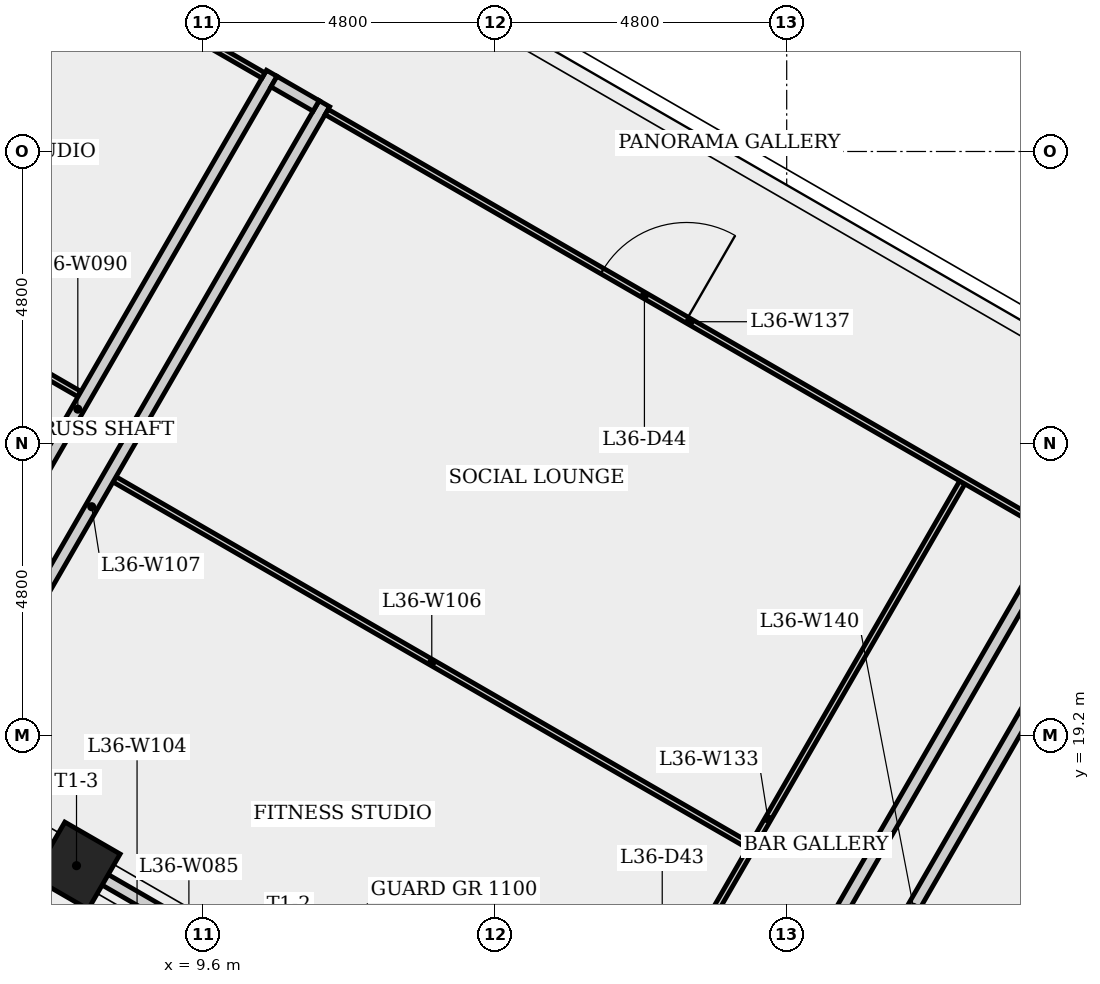
"""IFC4 building model, lengths in metres.
Left out: names, types, materials, properties, quantities, classifications, styles, units other than length and angle.
Written with IfcOpenShell. Run it as: python <this file> out.ifc"""

import sys

from ifc_helpers import new_model, si_unit, direction, frame, frame_2d, origin, origin_2d, place, context, subcontext, project, spatial, rectangle, extrude, element, fill, save


model = new_model("IFC4")
c1 = context("Model", 3, precision=1e-05, world=origin(), true_north=direction((0.0, 1.0)))
c2 = subcontext(c1, "Body", "Model", "MODEL_VIEW")
j1 = project(units=[si_unit("LENGTHUNIT", "METRE"), si_unit("PLANEANGLEUNIT", "RADIAN")], contexts=[c1])
p1 = place(None, origin())
s1 = spatial("IfcSite", under=j1, at=p1, CompositionType="ELEMENT")
p2 = place(p1, origin())
s2 = spatial("IfcBuilding", under=s1, at=p2, CompositionType="ELEMENT")
p3 = place(p2, frame((0.0, 0.0, 135.9)))
s3 = spatial("IfcBuildingStorey", under=s2, at=p3, CompositionType="ELEMENT", Elevation=135.9)
p4 = place(p3, frame((7.52, 17.054, 0.0), z_axis=(0.0, 0.0, 1.0), x_axis=(0.5, 0.866025403784, 0.0)))
e1 = element("IfcColumn", 1, at=p4, inside=s3, PredefinedType="COLUMN", context=c2, shape_type="SweptSolid", body=[
    extrude(rectangle(XDim=1.05, YDim=1.05, at=origin_2d()), origin(), (0.0, 0.0, 1.0), 4.0),
])
p5 = place(p3, frame((2.83, 27.546, 0.0), z_axis=(0.0, 0.0, 1.0), x_axis=(0.866035515232, -0.49998248605, 0.0)))
e2 = element("IfcWall", 2, at=p5, inside=s3, PredefinedType="PARTITIONING", context=c2, shape_type="SweptSolid", body=[
    extrude(rectangle(XDim=5.472, YDim=0.1, at=frame_2d((2.736, 0.0))), origin(), (0.0, 0.0, 1.0), 3.6),
])
p6 = place(p3, frame((3.133, 19.627, 0.0), z_axis=(0.0, 0.0, 1.0), x_axis=(0.866025783705, -0.499999341958, 0.0)))
e3 = element("IfcWall", 3, at=p6, inside=s3, PredefinedType="PLUMBINGWALL", context=c2, shape_type="SweptSolid", body=[
    extrude(rectangle(XDim=14.4, YDim=0.2, at=frame_2d((7.2, 0.0))), origin(), (0.0, 0.0, 1.0), 2.725),
])
p7 = place(p3, frame((4.352, 19.038, 0.0), z_axis=(0.0, 0.0, 1.0), x_axis=(0.500008481224, 0.866020507092, 0.0)))
e4 = element("IfcWall", 4, at=p7, inside=s3, PredefinedType="PLUMBINGWALL", context=c2, shape_type="SweptSolid", body=[
    extrude(rectangle(XDim=12.758, YDim=0.2, at=frame_2d((6.379, 0.0))), origin(), (0.0, 0.0, 1.0), 3.6),
])
p8 = place(p3, frame((3.7, 34.031, 0.0), z_axis=(0.0, 0.0, 1.0), x_axis=(0.866024725942, -0.500001174055, 0.0)))
e5 = element("IfcWall", 5, at=p8, inside=s3, PredefinedType="PARTITIONING", context=c2, shape_type="SweptSolid", body=[
    extrude(rectangle(XDim=7.961, YDim=0.1, at=frame_2d((3.981, 0.0))), origin(), (0.0, 0.0, 1.0), 3.6),
])
p9 = place(p8, frame((0.335, 0.0, 0.0)))
e6 = element("IfcOpeningElement", 6, at=p9, cuts=e5, PredefinedType="OPENING", context=c2, shape_type="SweptSolid", body=[
    extrude(rectangle(XDim=1.0, YDim=2.1, at=frame_2d((0.5, 1.05))), frame((0.0, 0.06, 0.0), z_axis=(0.0, -1.0, 0.0), x_axis=(1.0, 0.0, 0.0)), (0.0, 0.0, 1.0), 0.12),
])
p10 = place(p8, frame((4.046, 0.0, 0.0)))
e7 = element("IfcOpeningElement", 7, at=p10, cuts=e5, PredefinedType="OPENING", context=c2, shape_type="SweptSolid", body=[
    extrude(rectangle(XDim=1.6, YDim=2.1, at=frame_2d((0.8, 1.05))), frame((0.0, 0.06, 0.0), z_axis=(0.0, -1.0, 0.0), x_axis=(1.0, 0.0, 0.0)), (0.0, 0.0, 1.0), 0.12),
])
p11 = place(p3, frame((8.145, 23.408, 0.0), z_axis=(0.0, 0.0, 1.0), x_axis=(0.866032748968, -0.499987277554, 0.0)))
e8 = element("IfcWall", 8, at=p11, inside=s3, PredefinedType="PARTITIONING", context=c2, shape_type="SweptSolid", body=[
    extrude(rectangle(XDim=12.05, YDim=0.1, at=frame_2d((6.025, 0.0))), origin(), (0.0, 0.0, 1.0), 3.6),
])
p12 = place(p3, frame((5.219, 18.538, 0.0), z_axis=(0.0, 0.0, 1.0), x_axis=(0.499994128518, 0.86602879366, 0.0)))
e9 = element("IfcWall", 9, at=p12, inside=s3, PredefinedType="PLUMBINGWALL", context=c2, shape_type="SweptSolid", body=[
    extrude(rectangle(XDim=12.758, YDim=0.2, at=frame_2d((6.379, 0.0))), origin(), (0.0, 0.0, 1.0), 3.6),
])
p13 = place(p3, frame((10.768, 29.95, 0.0), z_axis=(0.0, 0.0, 1.0), x_axis=(0.865961984968, -0.500109828528, 0.0)))
e10 = element("IfcWall", 10, at=p13, inside=s3, PredefinedType="PLUMBINGWALL", context=c2, shape_type="SweptSolid", body=[
    extrude(rectangle(XDim=0.8, YDim=0.2, at=frame_2d((0.4, 0.0))), origin(), (0.0, 0.0, 1.0), 3.6),
])
p14 = place(p3, frame((15.381, 8.14, 0.0), z_axis=(0.0, 0.0, 1.0), x_axis=(0.500000327893, 0.866025214475, 0.0)))
e11 = element("IfcWall", 11, at=p14, inside=s3, PredefinedType="PLUMBINGWALL", context=c2, shape_type="SweptSolid", body=[
    extrude(rectangle(XDim=16.681, YDim=0.2, at=frame_2d((8.341, 0.0))), origin(), (0.0, 0.0, 1.0), 3.6),
])
p15 = place(p3, frame((15.697, 12.288, 0.0), z_axis=(0.0, 0.0, 1.0), x_axis=(0.500009610757, 0.86601985494, 0.0)))
e12 = element("IfcWall", 12, at=p15, inside=s3, PredefinedType="PARTITIONING", context=c2, shape_type="SweptSolid", body=[
    extrude(rectangle(XDim=12.781, YDim=0.1, at=frame_2d((6.391, 0.0))), origin(), (0.0, 0.0, 1.0), 3.6),
])
p16 = place(p15, frame((2.112, 0.0, 0.0)))
e13 = element("IfcOpeningElement", 13, at=p16, cuts=e12, PredefinedType="OPENING", context=c2, shape_type="SweptSolid", body=[
    extrude(rectangle(XDim=1.6, YDim=2.1, at=frame_2d((0.8, 1.05))), frame((0.0, 0.06, 0.0), z_axis=(0.0, -1.0, 0.0), x_axis=(1.0, 0.0, 0.0)), (0.0, 0.0, 1.0), 0.12),
])
p17 = place(p3, frame((11.634, 29.45, 0.0), z_axis=(0.0, 0.0, 1.0), x_axis=(0.866025616189, -0.499999632104, 0.0)))
e14 = element("IfcWall", 14, at=p17, inside=s3, PredefinedType="PARTITIONING", context=c2, shape_type="SweptSolid", body=[
    extrude(rectangle(XDim=13.8, YDim=0.1, at=frame_2d((6.9, 0.0))), origin(), (0.0, 0.0, 1.0), 3.6),
])
p18 = place(p17, frame((5.235, 0.0, 0.0)))
e15 = element("IfcOpeningElement", 15, at=p18, cuts=e14, PredefinedType="OPENING", context=c2, shape_type="SweptSolid", body=[
    extrude(rectangle(XDim=1.6, YDim=2.1, at=frame_2d((0.8, 1.05))), frame((0.0, 0.06, 0.0), z_axis=(0.0, -1.0, 0.0), x_axis=(1.0, 0.0, 0.0)), (0.0, 0.0, 1.0), 0.12),
])
p19 = place(p3, frame((21.589, 7.934, 0.0), z_axis=(0.0, 0.0, 1.0), x_axis=(0.691214032361, 0.722650096151, 0.0)))
e16 = element("IfcWall", 16, at=p19, inside=s3, PredefinedType="PLUMBINGWALL", context=c2, shape_type="SweptSolid", body=[
    extrude(rectangle(XDim=14.158, YDim=0.2, at=frame_2d((7.079, 0.0))), origin(), (0.0, 0.0, 1.0), 3.6),
])
p20 = place(p3, frame((24.488, 21.914, 0.0), z_axis=(0.0, 0.0, 1.0), x_axis=(-0.50000571756, -0.866022102725, 0.0)))
e17 = element("IfcWall", 17, at=p20, inside=s3, PredefinedType="PLUMBINGWALL", context=c2, shape_type="SweptSolid", body=[
    extrude(rectangle(XDim=12.807, YDim=0.2, at=frame_2d((6.404, 0.0))), origin(), (0.0, 0.0, 1.0), 3.6),
])
p21 = place(p3, frame((26.071, 21.057, 0.0), z_axis=(0.0, 0.0, 1.0), x_axis=(-0.499995447853, -0.866028031952, 0.0)))
e18 = element("IfcWall", 18, at=p21, inside=s3, PredefinedType="PARTITIONING", context=c2, shape_type="SweptSolid", body=[
    extrude(rectangle(XDim=8.103, YDim=0.1, at=frame_2d((4.051, 0.0))), origin(), (0.0, 0.0, 1.0), 3.6),
])
p22 = place(p21, frame((3.251, 0.0, 0.0)))
e19 = element("IfcOpeningElement", 19, at=p22, cuts=e18, PredefinedType="OPENING", context=c2, shape_type="SweptSolid", body=[
    extrude(rectangle(XDim=1.6, YDim=2.1, at=frame_2d((0.8, 1.05))), frame((0.0, 0.06, 0.0), z_axis=(0.0, -1.0, 0.0), x_axis=(1.0, 0.0, 0.0)), (0.0, 0.0, 1.0), 0.12),
])
p23 = place(p3, frame((32.128, 17.506, 0.0), z_axis=(0.0, 0.0, 1.0), x_axis=(-0.691207554904, -0.722656291776, 0.0)))
e20 = element("IfcWall", 20, at=p23, inside=s3, PredefinedType="PLUMBINGWALL", context=c2, shape_type="SweptSolid", body=[
    extrude(rectangle(XDim=13.958, YDim=0.2, at=frame_2d((6.979, 0.0))), origin(), (0.0, 0.0, 1.0), 3.6),
])
p24 = place(p18, origin())
e21 = element("IfcDoor", 21, at=p24, inside=s3, OperationType="SINGLE_SWING_RIGHT", PredefinedType="DOOR", context=c2, shape_type="SweptSolid", body=[
    extrude(rectangle(XDim=1.6, YDim=2.1, at=frame_2d((0.8, 1.05))), frame((0.0, 0.025, 0.0), z_axis=(0.0, -1.0, 0.0), x_axis=(1.0, 0.0, 0.0)), (0.0, 0.0, 1.0), 0.05),
])
fill(e15, e21)
save(model, sys.argv[1])
